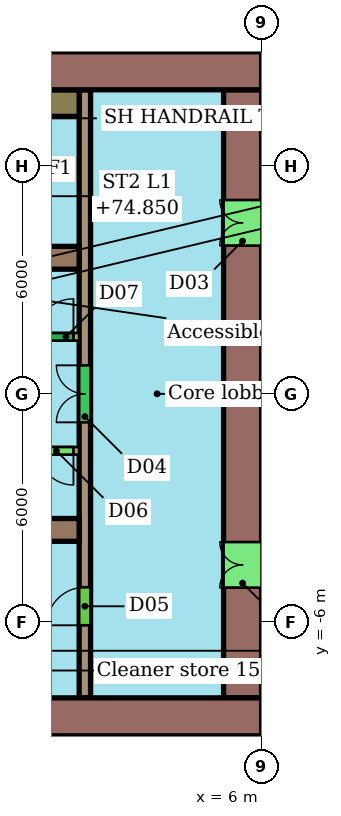
"""IFC4 building model, lengths in metres.
Left out: names, types, materials, properties, quantities, classifications, styles, units other than length and angle.
Written with IfcOpenShell. Run it as: python <this file> out.ifc"""

import sys

from ifc_helpers import new_model, si_unit, direction, frame, frame_2d, origin, place, context, subcontext, project, spatial, rectangle, extrude, element, fill, save


model = new_model("IFC4")
c1 = context("Model", 3, precision=1e-05, world=origin(), true_north=direction((0.0, 1.0)))
c2 = subcontext(c1, "Body", "Model", "MODEL_VIEW")
j1 = project(units=[si_unit("LENGTHUNIT", "METRE"), si_unit("PLANEANGLEUNIT", "RADIAN")], contexts=[c1])
p1 = place(None, origin())
s1 = spatial("IfcSite", under=j1, at=p1, CompositionType="ELEMENT")
p2 = place(p1, origin())
s2 = spatial("IfcBuilding", under=s1, at=p2, CompositionType="ELEMENT")
p3 = place(p2, frame((0.0, 0.0, 73.0)))
s3 = spatial("IfcBuildingStorey", under=s2, at=p3, CompositionType="ELEMENT", Elevation=73.0)
p4 = place(p3, frame((6.0, 8.5, 0.0), z_axis=(0.0, 0.0, 1.0), x_axis=(-1.0, 0.0, 0.0)))
e1 = element("IfcWall", 1, at=p4, inside=s3, PredefinedType="SHEAR", context=c2, shape_type="SweptSolid", body=[
    extrude(rectangle(XDim=12.0, YDim=1.0, at=frame_2d((6.0, 0.0))), origin(), (0.0, 0.0, 1.0), 3.4),
])
p5 = place(p4, frame((5.6, 0.0, 0.0)))
e2 = element("IfcOpeningElement", 2, at=p5, cuts=e1, PredefinedType="OPENING", context=c2, shape_type="SweptSolid", body=[
    extrude(rectangle(XDim=1.2, YDim=2.1, at=frame_2d((0.6, 1.05))), frame((0.0, 0.51, 0.0), z_axis=(0.0, -1.0, 0.0), x_axis=(1.0, 0.0, 0.0)), (0.0, 0.0, 1.0), 1.02),
])
p6 = place(p3, frame((-18.0, -8.5, 0.0), z_axis=(0.0, 0.0, 1.0), x_axis=(1.0, 0.0, 0.0)))
e3 = element("IfcWall", 3, at=p6, inside=s3, PredefinedType="SHEAR", context=c2, shape_type="SweptSolid", body=[
    extrude(rectangle(XDim=24.0, YDim=1.0, at=frame_2d((12.0, 0.0))), origin(), (0.0, 0.0, 1.0), 3.4),
])
p7 = place(p6, frame((6.0, 0.0, 0.0)))
e4 = element("IfcOpeningElement", 4, at=p7, cuts=e3, PredefinedType="OPENING", context=c2, shape_type="SweptSolid", body=[
    extrude(rectangle(XDim=1.2, YDim=2.1, at=frame_2d((0.6, 1.05))), frame((0.0, 0.51, 0.0), z_axis=(0.0, -1.0, 0.0), x_axis=(1.0, 0.0, 0.0)), (0.0, 0.0, 1.0), 1.02),
])
p8 = place(p3, frame((5.5, -8.0, 0.0), z_axis=(0.0, 0.0, 1.0), x_axis=(0.0, 1.0, 0.0)))
e5 = element("IfcWall", 5, at=p8, inside=s3, PredefinedType="SHEAR", context=c2, shape_type="SweptSolid", body=[
    extrude(rectangle(XDim=16.0, YDim=1.0, at=frame_2d((8.0, 0.0))), origin(), (0.0, 0.0, 1.0), 3.4),
])
p9 = place(p8, frame((2.9, 0.0, 0.0)))
e6 = element("IfcOpeningElement", 6, at=p9, cuts=e5, PredefinedType="OPENING", context=c2, shape_type="SweptSolid", body=[
    extrude(rectangle(XDim=1.2, YDim=2.1, at=frame_2d((0.6, 1.05))), frame((0.0, 0.51, 0.0), z_axis=(0.0, -1.0, 0.0), x_axis=(1.0, 0.0, 0.0)), (0.0, 0.0, 1.0), 1.02),
])
p10 = place(p8, frame((11.9, 0.0, 0.0)))
e7 = element("IfcOpeningElement", 7, at=p10, cuts=e5, PredefinedType="OPENING", context=c2, shape_type="SweptSolid", body=[
    extrude(rectangle(XDim=1.2, YDim=2.1, at=frame_2d((0.6, 1.05))), frame((0.0, 0.51, 0.0), z_axis=(0.0, -1.0, 0.0), x_axis=(1.0, 0.0, 0.0)), (0.0, 0.0, 1.0), 1.02),
])
for number, where, z_axis, x_axis in (
    (8, (-6.0, 3.58, 0.0), (0.0, 0.0, 1.0), (1.0, 0.0, 0.0)),
    (9, (-6.0, -3.58, 0.0), (0.0, 0.0, 1.0), (1.0, 0.0, 0.0)),
):
    element("IfcWall", number, at=place(p3, frame(where, z_axis=z_axis, x_axis=x_axis)), inside=s3, PredefinedType="SHEAR", context=c2, shape_type="SweptSolid", body=[
        extrude(rectangle(XDim=7.2, YDim=0.6, at=frame_2d((3.6, 0.0))), origin(), (0.0, 0.0, 1.0), 3.4),
    ])
p11 = place(p3, frame((1.35, -8.0, 0.0), z_axis=(0.0, 0.0, 1.0), x_axis=(0.0, 1.0, 0.0)))
e10 = element("IfcWall", 10, at=p11, inside=s3, PredefinedType="SHEAR", context=c2, shape_type="SweptSolid", body=[
    extrude(rectangle(XDim=16.0, YDim=0.3, at=frame_2d((8.0, 0.0))), origin(), (0.0, 0.0, 1.0), 3.4),
])
p12 = place(p11, frame((1.91, 0.0, 0.0)))
e11 = element("IfcOpeningElement", 11, at=p12, cuts=e10, PredefinedType="OPENING", context=c2, shape_type="SweptSolid", body=[
    extrude(rectangle(XDim=1.0, YDim=2.1, at=frame_2d((0.5, 1.05))), frame((0.0, 0.16, 0.0), z_axis=(0.0, -1.0, 0.0), x_axis=(1.0, 0.0, 0.0)), (0.0, 0.0, 1.0), 0.32),
])
p13 = place(p11, frame((7.25, 0.0, 0.0)))
e12 = element("IfcOpeningElement", 12, at=p13, cuts=e10, PredefinedType="OPENING", context=c2, shape_type="SweptSolid", body=[
    extrude(rectangle(XDim=1.5, YDim=2.1, at=frame_2d((0.75, 1.05))), frame((0.0, 0.16, 0.0), z_axis=(0.0, -1.0, 0.0), x_axis=(1.0, 0.0, 0.0)), (0.0, 0.0, 1.0), 0.32),
])
p14 = place(p3, frame((-13.2, 1.5, 0.0), z_axis=(0.0, 0.0, 1.0), x_axis=(1.0, 0.0, 0.0)))
e13 = element("IfcWall", 13, at=p14, inside=s3, PredefinedType="SHEAR", context=c2, shape_type="SweptSolid", body=[
    extrude(rectangle(XDim=14.4, YDim=0.2, at=frame_2d((7.2, 0.0))), origin(), (0.0, 0.0, 1.0), 3.4),
])
p15 = place(p14, frame((0.546, 0.0, 0.0)))
e14 = element("IfcOpeningElement", 14, at=p15, cuts=e13, PredefinedType="OPENING", context=c2, shape_type="SweptSolid", body=[
    extrude(rectangle(XDim=1.1, YDim=2.1, at=frame_2d((0.55, 1.05))), frame((0.0, 0.11, 0.0), z_axis=(0.0, -1.0, 0.0), x_axis=(1.0, 0.0, 0.0)), (0.0, 0.0, 1.0), 0.22),
])
p16 = place(p14, frame((2.988, 0.0, 0.0)))
e15 = element("IfcOpeningElement", 15, at=p16, cuts=e13, PredefinedType="OPENING", context=c2, shape_type="SweptSolid", body=[
    extrude(rectangle(XDim=1.1, YDim=2.1, at=frame_2d((0.55, 1.05))), frame((0.0, 0.11, 0.0), z_axis=(0.0, -1.0, 0.0), x_axis=(1.0, 0.0, 0.0)), (0.0, 0.0, 1.0), 0.22),
])
p17 = place(p14, frame((5.429, 0.0, 0.0)))
e16 = element("IfcOpeningElement", 16, at=p17, cuts=e13, PredefinedType="OPENING", context=c2, shape_type="SweptSolid", body=[
    extrude(rectangle(XDim=1.1, YDim=2.1, at=frame_2d((0.55, 1.05))), frame((0.0, 0.11, 0.0), z_axis=(0.0, -1.0, 0.0), x_axis=(1.0, 0.0, 0.0)), (0.0, 0.0, 1.0), 0.22),
])
p18 = place(p14, frame((7.871, 0.0, 0.0)))
e17 = element("IfcOpeningElement", 17, at=p18, cuts=e13, PredefinedType="OPENING", context=c2, shape_type="SweptSolid", body=[
    extrude(rectangle(XDim=1.1, YDim=2.1, at=frame_2d((0.55, 1.05))), frame((0.0, 0.11, 0.0), z_axis=(0.0, -1.0, 0.0), x_axis=(1.0, 0.0, 0.0)), (0.0, 0.0, 1.0), 0.22),
])
p19 = place(p14, frame((11.607, 0.0, 0.0)))
e18 = element("IfcOpeningElement", 18, at=p19, cuts=e13, PredefinedType="OPENING", context=c2, shape_type="SweptSolid", body=[
    extrude(rectangle(XDim=0.9, YDim=2.1, at=frame_2d((0.45, 1.05))), frame((0.0, 0.11, 0.0), z_axis=(0.0, -1.0, 0.0), x_axis=(1.0, 0.0, 0.0)), (0.0, 0.0, 1.0), 0.22),
])
p20 = place(p14, frame((13.25, 0.0, 0.0)))
e19 = element("IfcOpeningElement", 19, at=p20, cuts=e13, PredefinedType="OPENING", context=c2, shape_type="SweptSolid", body=[
    extrude(rectangle(XDim=1.0, YDim=2.1, at=frame_2d((0.5, 1.05))), frame((0.0, 0.11, 0.0), z_axis=(0.0, -1.0, 0.0), x_axis=(1.0, 0.0, 0.0)), (0.0, 0.0, 1.0), 0.22),
])
p21 = place(p3, frame((1.2, -1.5, 0.0), z_axis=(0.0, 0.0, 1.0), x_axis=(-1.0, 0.0, 0.0)))
e20 = element("IfcWall", 20, at=p21, inside=s3, PredefinedType="SHEAR", context=c2, shape_type="SweptSolid", body=[
    extrude(rectangle(XDim=14.4, YDim=0.2, at=frame_2d((7.2, 0.0))), origin(), (0.0, 0.0, 1.0), 3.4),
])
p22 = place(p21, frame((7.821, 0.0, 0.0)))
e21 = element("IfcOpeningElement", 21, at=p22, cuts=e20, PredefinedType="OPENING", context=c2, shape_type="SweptSolid", body=[
    extrude(rectangle(XDim=1.2, YDim=2.1, at=frame_2d((0.6, 1.05))), frame((0.0, 0.11, 0.0), z_axis=(0.0, -1.0, 0.0), x_axis=(1.0, 0.0, 0.0)), (0.0, 0.0, 1.0), 0.22),
])
p23 = place(p21, frame((0.15, 0.0, 0.0)))
e22 = element("IfcOpeningElement", 22, at=p23, cuts=e20, PredefinedType="OPENING", context=c2, shape_type="SweptSolid", body=[
    extrude(rectangle(XDim=0.9, YDim=2.1, at=frame_2d((0.45, 1.05))), frame((0.0, 0.11, 0.0), z_axis=(0.0, -1.0, 0.0), x_axis=(1.0, 0.0, 0.0)), (0.0, 0.0, 1.0), 0.22),
])
p24 = place(p3, frame((0.4, 7.65, 0.0), z_axis=(0.0, 0.0, 1.0), x_axis=(1.0, 0.0, 0.0)))
e23 = element("IfcWall", 23, at=p24, inside=s3, PredefinedType="SHEAR", context=c2, shape_type="SweptSolid", body=[
    extrude(rectangle(XDim=0.8, YDim=0.7, at=frame_2d((0.4, 0.0))), origin(), (0.0, 0.0, 1.0), 3.4),
])
p25 = place(p9, origin())
e24 = element("IfcDoor", 24, at=p25, inside=s3, OperationType="DOUBLE_DOOR_SINGLE_SWING", PredefinedType="NOTDEFINED", context=c2, shape_type="SweptSolid", body=[
    extrude(rectangle(XDim=1.2, YDim=2.1, at=frame_2d((0.6, 1.05))), frame((0.0, 0.025, 0.0), z_axis=(0.0, -1.0, 0.0), x_axis=(1.0, 0.0, 0.0)), (0.0, 0.0, 1.0), 0.05),
])
fill(e6, e24)
p26 = place(p10, origin())
e25 = element("IfcDoor", 25, at=p26, inside=s3, OperationType="DOUBLE_DOOR_SINGLE_SWING", PredefinedType="NOTDEFINED", context=c2, shape_type="SweptSolid", body=[
    extrude(rectangle(XDim=1.2, YDim=2.1, at=frame_2d((0.6, 1.05))), frame((0.0, 0.025, 0.0), z_axis=(0.0, -1.0, 0.0), x_axis=(1.0, 0.0, 0.0)), (0.0, 0.0, 1.0), 0.05),
])
fill(e7, e25)
p27 = place(p12, origin())
e26 = element("IfcDoor", 26, at=p27, inside=s3, OperationType="SINGLE_SWING_LEFT", PredefinedType="NOTDEFINED", context=c2, shape_type="SweptSolid", body=[
    extrude(rectangle(XDim=1.0, YDim=2.1, at=frame_2d((0.5, 1.05))), frame((0.0, 0.025, 0.0), z_axis=(0.0, -1.0, 0.0), x_axis=(1.0, 0.0, 0.0)), (0.0, 0.0, 1.0), 0.05),
])
fill(e11, e26)
p28 = place(p13, origin())
e27 = element("IfcDoor", 27, at=p28, inside=s3, OperationType="DOUBLE_DOOR_SINGLE_SWING", PredefinedType="NOTDEFINED", context=c2, shape_type="SweptSolid", body=[
    extrude(rectangle(XDim=1.5, YDim=2.1, at=frame_2d((0.75, 1.05))), frame((0.0, 0.025, 0.0), z_axis=(0.0, -1.0, 0.0), x_axis=(1.0, 0.0, 0.0)), (0.0, 0.0, 1.0), 0.05),
])
fill(e12, e27)
p29 = place(p20, origin())
e28 = element("IfcDoor", 28, at=p29, inside=s3, OperationType="SINGLE_SWING_RIGHT", PredefinedType="NOTDEFINED", context=c2, shape_type="SweptSolid", body=[
    extrude(rectangle(XDim=1.0, YDim=2.1, at=frame_2d((0.5, 1.05))), frame((0.0, 0.025, 0.0), z_axis=(0.0, -1.0, 0.0), x_axis=(1.0, 0.0, 0.0)), (0.0, 0.0, 1.0), 0.05),
])
fill(e19, e28)
p30 = place(p23, origin())
e29 = element("IfcDoor", 29, at=p30, inside=s3, OperationType="SINGLE_SWING_LEFT", PredefinedType="NOTDEFINED", context=c2, shape_type="SweptSolid", body=[
    extrude(rectangle(XDim=0.9, YDim=2.1, at=frame_2d((0.45, 1.05))), frame((0.0, 0.025, 0.0), z_axis=(0.0, -1.0, 0.0), x_axis=(1.0, 0.0, 0.0)), (0.0, 0.0, 1.0), 0.05),
])
fill(e22, e29)
save(model, sys.argv[1])
